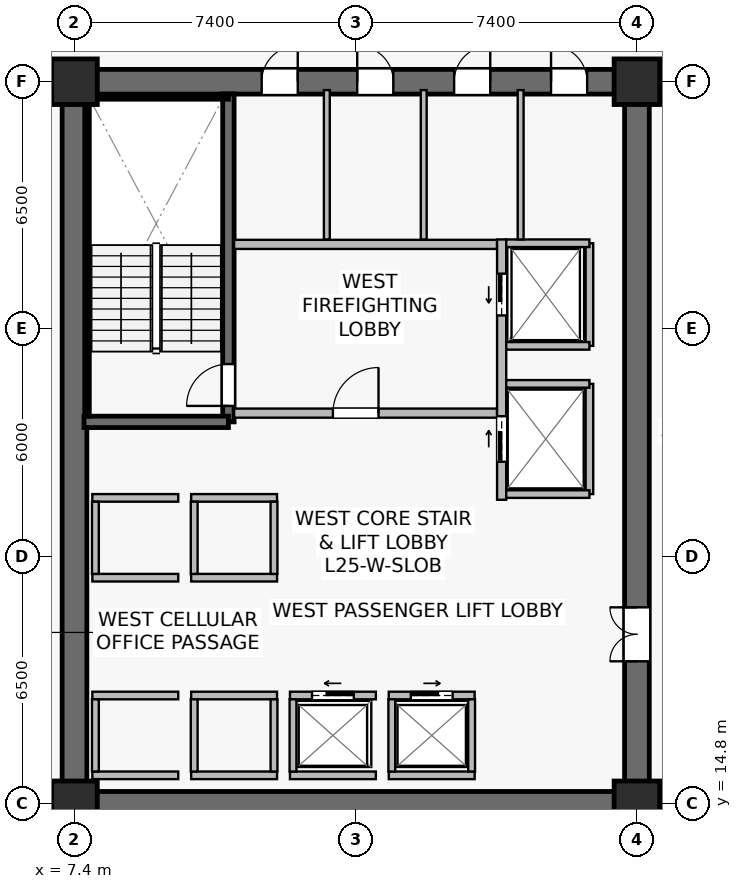
"""IFC4 building model, lengths in metres.
Left out: names, types, materials, properties, quantities, classifications, styles, units other than length and angle.
Written with IfcOpenShell. Run it as: python <this file> out.ifc"""

import sys

from ifc_helpers import new_model, si_unit, direction, frame, frame_2d, origin, origin_2d, place, context, subcontext, project, spatial, rectangle, extrude, source, transform, mapped, element, fill, save


model = new_model("IFC4")
c1 = context("Model", 3, precision=1e-05, world=origin(), true_north=direction((0.0, 1.0)))
c2 = subcontext(c1, "Body", "Model", "MODEL_VIEW")
j1 = project(units=[si_unit("LENGTHUNIT", "METRE"), si_unit("PLANEANGLEUNIT", "RADIAN")], contexts=[c1])
p1 = place(None, origin())
s1 = spatial("IfcSite", under=j1, at=p1, CompositionType="ELEMENT")
p2 = place(p1, origin())
s2 = spatial("IfcBuilding", under=s1, at=p2, CompositionType="ELEMENT")
p3 = place(p2, frame((0.0, 0.0, 105.1)))
s3 = spatial("IfcBuildingStorey", under=s2, at=p3, CompositionType="ELEMENT", Elevation=105.1)
p4 = place(p3, frame((7.075, 14.8, 0.0), z_axis=(0.0, 0.0, 1.0), x_axis=(1.0, 0.0, 0.0)))
e1 = element("IfcWall", 1, at=p4, inside=s3, PredefinedType="SHEAR", context=c2, shape_type="SweptSolid", body=[
    extrude(rectangle(XDim=15.45, YDim=0.65, at=frame_2d((7.725, 0.0))), origin(), (0.0, 0.0, 1.0), 3.79),
])
p5 = place(p3, frame((7.075, 33.8, 0.0), z_axis=(0.0, 0.0, 1.0), x_axis=(1.0, 0.0, 0.0)))
e2 = element("IfcWall", 2, at=p5, inside=s3, PredefinedType="SHEAR", context=c2, shape_type="SweptSolid", body=[
    extrude(rectangle(XDim=15.45, YDim=0.65, at=frame_2d((7.725, 0.0))), origin(), (0.0, 0.0, 1.0), 3.79),
])
p6 = place(p5, frame((5.25, 0.0, 0.0)))
e3 = element("IfcOpeningElement", 3, at=p6, cuts=e2, PredefinedType="OPENING", context=c2, shape_type="SweptSolid", body=[
    extrude(rectangle(XDim=0.95, YDim=2.15, at=frame_2d((0.475, 1.075))), frame((0.0, 0.335, 0.0), z_axis=(0.0, -1.0, 0.0), x_axis=(1.0, 0.0, 0.0)), (0.0, 0.0, 1.0), 0.67),
])
p7 = place(p5, frame((7.765, 0.0, 0.0)))
e4 = element("IfcOpeningElement", 4, at=p7, cuts=e2, PredefinedType="OPENING", context=c2, shape_type="SweptSolid", body=[
    extrude(rectangle(XDim=0.95, YDim=2.15, at=frame_2d((0.475, 1.075))), frame((0.0, 0.335, 0.0), z_axis=(0.0, -1.0, 0.0), x_axis=(1.0, 0.0, 0.0)), (0.0, 0.0, 1.0), 0.67),
])
p8 = place(p5, frame((10.315, 0.0, 0.0)))
e5 = element("IfcOpeningElement", 5, at=p8, cuts=e2, PredefinedType="OPENING", context=c2, shape_type="SweptSolid", body=[
    extrude(rectangle(XDim=0.95, YDim=2.15, at=frame_2d((0.475, 1.075))), frame((0.0, 0.335, 0.0), z_axis=(0.0, -1.0, 0.0), x_axis=(1.0, 0.0, 0.0)), (0.0, 0.0, 1.0), 0.67),
])
p9 = place(p5, frame((12.865, 0.0, 0.0)))
e6 = element("IfcOpeningElement", 6, at=p9, cuts=e2, PredefinedType="OPENING", context=c2, shape_type="SweptSolid", body=[
    extrude(rectangle(XDim=0.95, YDim=2.15, at=frame_2d((0.475, 1.075))), frame((0.0, 0.335, 0.0), z_axis=(0.0, -1.0, 0.0), x_axis=(1.0, 0.0, 0.0)), (0.0, 0.0, 1.0), 0.67),
])
p10 = place(p3, frame((7.4, 15.125, 0.0), z_axis=(0.0, 0.0, 1.0), x_axis=(0.0, 1.0, 0.0)))
e7 = element("IfcWall", 7, at=p10, inside=s3, PredefinedType="SHEAR", context=c2, shape_type="SweptSolid", body=[
    extrude(rectangle(XDim=18.35, YDim=0.65, at=frame_2d((9.175, 0.0))), origin(), (0.0, 0.0, 1.0), 3.79),
])
p11 = place(p3, frame((22.2, 15.125, 0.0), z_axis=(0.0, 0.0, 1.0), x_axis=(0.0, 1.0, 0.0)))
e8 = element("IfcWall", 8, at=p11, inside=s3, PredefinedType="SHEAR", context=c2, shape_type="SweptSolid", body=[
    extrude(rectangle(XDim=18.35, YDim=0.65, at=frame_2d((9.175, 0.0))), origin(), (0.0, 0.0, 1.0), 3.79),
])
p12 = place(p11, frame((3.425, 0.0, 0.0)))
e9 = element("IfcOpeningElement", 9, at=p12, cuts=e8, PredefinedType="OPENING", context=c2, shape_type="SweptSolid", body=[
    extrude(rectangle(XDim=1.42, YDim=2.2, at=frame_2d((0.71, 1.1))), frame((0.0, 0.335, 0.0), z_axis=(0.0, -1.0, 0.0), x_axis=(1.0, 0.0, 0.0)), (0.0, 0.0, 1.0), 0.67),
])
p13 = place(p3, frame((11.45, 24.85, 0.0), z_axis=(0.0, 0.0, 1.0), x_axis=(0.0, 1.0, 0.0)))
e10 = element("IfcWall", 10, at=p13, inside=s3, PredefinedType="SHEAR", context=c2, shape_type="SweptSolid", body=[
    extrude(rectangle(XDim=8.63, YDim=0.3, at=frame_2d((4.315, 0.0))), origin(), (0.0, 0.0, 1.0), 3.79),
])
p14 = place(p13, frame((0.42, 0.0, 0.0)))
e11 = element("IfcOpeningElement", 11, at=p14, cuts=e10, PredefinedType="OPENING", context=c2, shape_type="SweptSolid", body=[
    extrude(rectangle(XDim=1.1, YDim=2.15, at=frame_2d((0.55, 1.075))), frame((0.0, 0.16, 0.0), z_axis=(0.0, -1.0, 0.0), x_axis=(1.0, 0.0, 0.0)), (0.0, 0.0, 1.0), 0.32),
])
p15 = place(p3, frame((7.65, 24.85, 0.0), z_axis=(0.0, 0.0, 1.0), x_axis=(1.0, 0.0, 0.0)))
e12 = element("IfcWall", 12, at=p15, inside=s3, PredefinedType="SHEAR", context=c2, shape_type="SweptSolid", body=[
    extrude(rectangle(XDim=3.8, YDim=0.3, at=frame_2d((1.9, 0.0))), origin(), (0.0, 0.0, 1.0), 3.79),
])
p16 = place(p3, frame((7.73, 33.4, 0.0), z_axis=(0.0, 0.0, 1.0), x_axis=(1.0, 0.0, 0.0)))
e13 = element("IfcWall", 13, at=p16, inside=s3, PredefinedType="SOLIDWALL", context=c2, shape_type="SweptSolid", body=[
    extrude(rectangle(XDim=3.72, YDim=0.12, at=frame_2d((1.86, 0.0))), origin(), (0.0, 0.0, 1.0), 3.79),
])
p17 = place(p3, frame((7.73, 25.0, 0.0), z_axis=(0.0, 0.0, 1.0), x_axis=(0.0, 1.0, 0.0)))
e14 = element("IfcWall", 14, at=p17, inside=s3, PredefinedType="SOLIDWALL", context=c2, shape_type="SweptSolid", body=[
    extrude(rectangle(XDim=8.32, YDim=0.12, at=frame_2d((4.16, 0.0))), origin(), (0.0, 0.0, 1.0), 3.79),
])
m1 = source(origin(), c2, "Body", "SweptSolid", [
    extrude(rectangle(XDim=1.2, YDim=1.2, at=origin_2d()), origin(), (0.0, 0.0, 1.0), 4.1),
])
for number, where, z_axis, x_axis in (
    (15, (7.4, 14.8, 0.0), (0.0, 0.0, 1.0), (1.0, 0.0, 0.0)),
    (16, (22.2, 14.8, 0.0), (0.0, 0.0, 1.0), (1.0, 0.0, 0.0)),
    (17, (7.4, 33.8, 0.0), (0.0, 0.0, 1.0), (1.0, 0.0, 0.0)),
    (18, (22.2, 33.8, 0.0), (0.0, 0.0, 1.0), (1.0, 0.0, 0.0)),
):
    element("IfcColumn", number, at=place(p3, frame(where, z_axis=z_axis, x_axis=x_axis)), inside=s3, PredefinedType="COLUMN", context=c2, shape_type="MappedRepresentation", body=[
        mapped(m1, transform((0.0, 0.0, 0.0), scale=1.0)),
    ])
p18 = place(p3, frame((11.6, 25.08, 0.0), z_axis=(0.0, 0.0, 1.0), x_axis=(1.0, 0.0, 0.0)))
e19 = element("IfcWall", 19, at=p18, inside=s3, PredefinedType="SOLIDWALL", context=c2, shape_type="SweptSolid", body=[
    extrude(rectangle(XDim=6.92, YDim=0.24, at=frame_2d((3.46, 0.0))), origin(), (0.0, 0.0, 1.0), 3.125),
])
p19 = place(p18, frame((2.6, 0.0, 0.0)))
e20 = element("IfcOpeningElement", 20, at=p19, cuts=e19, PredefinedType="OPENING", context=c2, shape_type="SweptSolid", body=[
    extrude(rectangle(XDim=1.2, YDim=2.16, at=frame_2d((0.6, 1.08))), frame((0.0, 0.13, 0.0), z_axis=(0.0, -1.0, 0.0), x_axis=(1.0, 0.0, 0.0)), (0.0, 0.0, 1.0), 0.26),
])
p20 = place(p3, frame((11.6, 29.52, 0.0), z_axis=(0.0, 0.0, 1.0), x_axis=(1.0, 0.0, 0.0)))
e21 = element("IfcWall", 21, at=p20, inside=s3, PredefinedType="SOLIDWALL", context=c2, shape_type="SweptSolid", body=[
    extrude(rectangle(XDim=6.92, YDim=0.24, at=frame_2d((3.46, 0.0))), origin(), (0.0, 0.0, 1.0), 3.125),
])
p21 = place(p3, frame((18.64, 22.8, 0.0), z_axis=(0.0, 0.0, 1.0), x_axis=(0.0, 1.0, 0.0)))
e22 = element("IfcWall", 22, at=p21, inside=s3, PredefinedType="SOLIDWALL", context=c2, shape_type="SweptSolid", body=[
    extrude(rectangle(XDim=6.85, YDim=0.24, at=frame_2d((3.425, 0.0))), origin(), (0.0, 0.0, 1.0), 2.875),
])
p22 = place(p21, frame((4.85, 0.0, 0.0)))
e23 = element("IfcOpeningElement", 23, at=p22, cuts=e22, PredefinedType="OPENING", context=c2, shape_type="SweptSolid", body=[
    extrude(rectangle(XDim=1.1, YDim=2.22, at=frame_2d((0.55, 1.11))), frame((0.0, 0.13, 0.0), z_axis=(0.0, -1.0, 0.0), x_axis=(1.0, 0.0, 0.0)), (0.0, 0.0, 1.0), 0.26),
])
p23 = place(p21, frame((1.0, 0.0, 0.0)))
e24 = element("IfcOpeningElement", 24, at=p23, cuts=e22, PredefinedType="OPENING", context=c2, shape_type="SweptSolid", body=[
    extrude(rectangle(XDim=1.2, YDim=2.22, at=frame_2d((0.6, 1.11))), frame((0.0, 0.13, 0.0), z_axis=(0.0, -1.0, 0.0), x_axis=(1.0, 0.0, 0.0)), (0.0, 0.0, 1.0), 0.26),
])
for number, where, z_axis, x_axis in (
    (25, (7.87, 17.65, 0.0), (0.0, 0.0, 1.0), (1.0, 0.0, 0.0)),
    (26, (7.87, 15.55, 0.0), (0.0, 0.0, 1.0), (1.0, 0.0, 0.0)),
):
    element("IfcWall", number, at=place(p3, frame(where, z_axis=z_axis, x_axis=x_axis)), inside=s3, PredefinedType="SOLIDWALL", context=c2, shape_type="SweptSolid", body=[
        extrude(rectangle(XDim=2.26, YDim=0.2, at=frame_2d((1.13, 0.0))), origin(), (0.0, 0.0, 1.0), 3.79),
    ])
p24 = place(p3, frame((7.95, 15.65, 0.0), z_axis=(0.0, 0.0, 1.0), x_axis=(0.0, 1.0, 0.0)))
e27 = element("IfcWall", 27, at=p24, inside=s3, PredefinedType="SOLIDWALL", context=c2, shape_type="SweptSolid", body=[
    extrude(rectangle(XDim=1.9, YDim=0.18, at=frame_2d((0.95, 0.0))), origin(), (0.0, 0.0, 1.0), 3.79),
])
for number, where, z_axis, x_axis in (
    (28, (10.47, 17.65, 0.0), (0.0, 0.0, 1.0), (1.0, 0.0, 0.0)),
    (29, (10.47, 15.55, 0.0), (0.0, 0.0, 1.0), (1.0, 0.0, 0.0)),
):
    element("IfcWall", number, at=place(p3, frame(where, z_axis=z_axis, x_axis=x_axis)), inside=s3, PredefinedType="SOLIDWALL", context=c2, shape_type="SweptSolid", body=[
        extrude(rectangle(XDim=2.26, YDim=0.2, at=frame_2d((1.13, 0.0))), origin(), (0.0, 0.0, 1.0), 3.79),
    ])
for number, where, z_axis, x_axis in (
    (30, (10.55, 15.65, 0.0), (0.0, 0.0, 1.0), (0.0, 1.0, 0.0)),
    (31, (12.65, 15.65, 0.0), (0.0, 0.0, 1.0), (0.0, 1.0, 0.0)),
):
    element("IfcWall", number, at=place(p3, frame(where, z_axis=z_axis, x_axis=x_axis)), inside=s3, PredefinedType="SOLIDWALL", context=c2, shape_type="SweptSolid", body=[
        extrude(rectangle(XDim=1.9, YDim=0.18, at=frame_2d((0.95, 0.0))), origin(), (0.0, 0.0, 1.0), 3.79),
    ])
p25 = place(p3, frame((13.07, 17.65, 0.0), z_axis=(0.0, 0.0, 1.0), x_axis=(1.0, 0.0, 0.0)))
e32 = element("IfcWall", 32, at=p25, inside=s3, PredefinedType="SOLIDWALL", context=c2, shape_type="SweptSolid", body=[
    extrude(rectangle(XDim=2.26, YDim=0.2, at=frame_2d((1.13, 0.0))), origin(), (0.0, 0.0, 1.0), 3.125),
])
p26 = place(p25, frame((0.58, 0.0, 0.0)))
e33 = element("IfcOpeningElement", 33, at=p26, cuts=e32, PredefinedType="OPENING", context=c2, shape_type="SweptSolid", body=[
    extrude(rectangle(XDim=1.1, YDim=2.22, at=frame_2d((0.55, 1.11))), frame((0.0, 0.11, 0.0), z_axis=(0.0, -1.0, 0.0), x_axis=(1.0, 0.0, 0.0)), (0.0, 0.0, 1.0), 0.22),
])
p27 = place(p3, frame((13.07, 15.55, 0.0), z_axis=(0.0, 0.0, 1.0), x_axis=(1.0, 0.0, 0.0)))
e34 = element("IfcWall", 34, at=p27, inside=s3, PredefinedType="SOLIDWALL", context=c2, shape_type="SweptSolid", body=[
    extrude(rectangle(XDim=2.26, YDim=0.2, at=frame_2d((1.13, 0.0))), origin(), (0.0, 0.0, 1.0), 3.125),
])
p28 = place(p3, frame((13.15, 15.65, 0.0), z_axis=(0.0, 0.0, 1.0), x_axis=(0.0, 1.0, 0.0)))
e35 = element("IfcWall", 35, at=p28, inside=s3, PredefinedType="SOLIDWALL", context=c2, shape_type="SweptSolid", body=[
    extrude(rectangle(XDim=1.9, YDim=0.18, at=frame_2d((0.95, 0.0))), origin(), (0.0, 0.0, 1.0), 3.79),
])
p29 = place(p3, frame((15.67, 17.65, 0.0), z_axis=(0.0, 0.0, 1.0), x_axis=(1.0, 0.0, 0.0)))
e36 = element("IfcWall", 36, at=p29, inside=s3, PredefinedType="SOLIDWALL", context=c2, shape_type="SweptSolid", body=[
    extrude(rectangle(XDim=2.26, YDim=0.2, at=frame_2d((1.13, 0.0))), origin(), (0.0, 0.0, 1.0), 3.79),
])
p30 = place(p29, frame((0.58, 0.0, 0.0)))
e37 = element("IfcOpeningElement", 37, at=p30, cuts=e36, PredefinedType="OPENING", context=c2, shape_type="SweptSolid", body=[
    extrude(rectangle(XDim=1.1, YDim=2.22, at=frame_2d((0.55, 1.11))), frame((0.0, 0.11, 0.0), z_axis=(0.0, -1.0, 0.0), x_axis=(1.0, 0.0, 0.0)), (0.0, 0.0, 1.0), 0.22),
])
p31 = place(p3, frame((15.67, 15.55, 0.0), z_axis=(0.0, 0.0, 1.0), x_axis=(1.0, 0.0, 0.0)))
e38 = element("IfcWall", 38, at=p31, inside=s3, PredefinedType="SOLIDWALL", context=c2, shape_type="SweptSolid", body=[
    extrude(rectangle(XDim=2.26, YDim=0.2, at=frame_2d((1.13, 0.0))), origin(), (0.0, 0.0, 1.0), 3.79),
])
for number, where, z_axis, x_axis in (
    (39, (15.75, 15.65, 0.0), (0.0, 0.0, 1.0), (0.0, 1.0, 0.0)),
    (40, (17.85, 15.65, 0.0), (0.0, 0.0, 1.0), (0.0, 1.0, 0.0)),
):
    element("IfcWall", number, at=place(p3, frame(where, z_axis=z_axis, x_axis=x_axis)), inside=s3, PredefinedType="SOLIDWALL", context=c2, shape_type="SweptSolid", body=[
        extrude(rectangle(XDim=1.9, YDim=0.18, at=frame_2d((0.95, 0.0))), origin(), (0.0, 0.0, 1.0), 3.79),
    ])
for number, where, z_axis, x_axis in (
    (41, (7.87, 20.75, 0.0), (0.0, 0.0, 1.0), (1.0, 0.0, 0.0)),
    (42, (7.87, 22.85, 0.0), (0.0, 0.0, 1.0), (1.0, 0.0, 0.0)),
):
    element("IfcWall", number, at=place(p3, frame(where, z_axis=z_axis, x_axis=x_axis)), inside=s3, PredefinedType="SOLIDWALL", context=c2, shape_type="SweptSolid", body=[
        extrude(rectangle(XDim=2.26, YDim=0.2, at=frame_2d((1.13, 0.0))), origin(), (0.0, 0.0, 1.0), 3.79),
    ])
p32 = place(p3, frame((7.95, 20.85, 0.0), z_axis=(0.0, 0.0, 1.0), x_axis=(0.0, 1.0, 0.0)))
e43 = element("IfcWall", 43, at=p32, inside=s3, PredefinedType="SOLIDWALL", context=c2, shape_type="SweptSolid", body=[
    extrude(rectangle(XDim=1.9, YDim=0.18, at=frame_2d((0.95, 0.0))), origin(), (0.0, 0.0, 1.0), 3.79),
])
for number, where, z_axis, x_axis in (
    (44, (10.47, 20.75, 0.0), (0.0, 0.0, 1.0), (1.0, 0.0, 0.0)),
    (45, (10.47, 22.85, 0.0), (0.0, 0.0, 1.0), (1.0, 0.0, 0.0)),
):
    element("IfcWall", number, at=place(p3, frame(where, z_axis=z_axis, x_axis=x_axis)), inside=s3, PredefinedType="SOLIDWALL", context=c2, shape_type="SweptSolid", body=[
        extrude(rectangle(XDim=2.26, YDim=0.2, at=frame_2d((1.13, 0.0))), origin(), (0.0, 0.0, 1.0), 3.79),
    ])
for number, where, z_axis, x_axis in (
    (46, (10.55, 20.85, 0.0), (0.0, 0.0, 1.0), (0.0, 1.0, 0.0)),
    (47, (12.65, 20.85, 0.0), (0.0, 0.0, 1.0), (0.0, 1.0, 0.0)),
):
    element("IfcWall", number, at=place(p3, frame(where, z_axis=z_axis, x_axis=x_axis)), inside=s3, PredefinedType="SOLIDWALL", context=c2, shape_type="SweptSolid", body=[
        extrude(rectangle(XDim=1.9, YDim=0.18, at=frame_2d((0.95, 0.0))), origin(), (0.0, 0.0, 1.0), 3.79),
    ])
p33 = place(p3, frame((20.95, 26.85, 0.0), z_axis=(0.0, 0.0, 1.0), x_axis=(0.0, 1.0, 0.0)))
e48 = element("IfcWall", 48, at=p33, inside=s3, PredefinedType="SOLIDWALL", context=c2, shape_type="SweptSolid", body=[
    extrude(rectangle(XDim=2.7, YDim=0.2, at=frame_2d((1.35, 0.0))), origin(), (0.0, 0.0, 1.0), 3.79),
])
p34 = place(p3, frame((18.76, 29.55, 0.0), z_axis=(0.0, 0.0, 1.0), x_axis=(1.0, 0.0, 0.0)))
e49 = element("IfcWall", 49, at=p34, inside=s3, PredefinedType="SOLIDWALL", context=c2, shape_type="SweptSolid", body=[
    extrude(rectangle(XDim=2.19, YDim=0.2, at=frame_2d((1.095, 0.0))), origin(), (0.0, 0.0, 1.0), 3.79),
])
p35 = place(p3, frame((18.76, 26.85, 0.0), z_axis=(0.0, 0.0, 1.0), x_axis=(1.0, 0.0, 0.0)))
e50 = element("IfcWall", 50, at=p35, inside=s3, PredefinedType="SOLIDWALL", context=c2, shape_type="SweptSolid", body=[
    extrude(rectangle(XDim=2.19, YDim=0.2, at=frame_2d((1.095, 0.0))), origin(), (0.0, 0.0, 1.0), 3.187),
])
p36 = place(p3, frame((20.95, 22.95, 0.0), z_axis=(0.0, 0.0, 1.0), x_axis=(0.0, 1.0, 0.0)))
e51 = element("IfcWall", 51, at=p36, inside=s3, PredefinedType="SOLIDWALL", context=c2, shape_type="SweptSolid", body=[
    extrude(rectangle(XDim=2.9, YDim=0.2, at=frame_2d((1.45, 0.0))), origin(), (0.0, 0.0, 1.0), 2.875),
])
for number, where, z_axis, x_axis in (
    (52, (18.76, 25.85, 0.0), (0.0, 0.0, 1.0), (1.0, 0.0, 0.0)),
    (53, (18.76, 22.95, 0.0), (0.0, 0.0, 1.0), (1.0, 0.0, 0.0)),
):
    element("IfcWall", number, at=place(p3, frame(where, z_axis=z_axis, x_axis=x_axis)), inside=s3, PredefinedType="SOLIDWALL", context=c2, shape_type="SweptSolid", body=[
        extrude(rectangle(XDim=2.19, YDim=0.2, at=frame_2d((1.095, 0.0))), origin(), (0.0, 0.0, 1.0), 3.79),
    ])
for number, where, z_axis, x_axis in (
    (54, (14.04, 29.65, 0.0), (0.0, 0.0, 1.0), (0.0, 1.0, 0.0)),
    (55, (16.59, 29.65, 0.0), (0.0, 0.0, 1.0), (0.0, 1.0, 0.0)),
    (56, (19.14, 29.65, 0.0), (0.0, 0.0, 1.0), (0.0, 1.0, 0.0)),
):
    element("IfcWall", number, at=place(p3, frame(where, z_axis=z_axis, x_axis=x_axis)), inside=s3, PredefinedType="PLUMBINGWALL", context=c2, shape_type="SweptSolid", body=[
        extrude(rectangle(XDim=3.93, YDim=0.155, at=frame_2d((1.965, 0.0))), origin(), (0.0, 0.0, 1.0), 3.79),
    ])
m2 = source(origin(), c2, "Body", "SweptSolid", [
    extrude(rectangle(XDim=1.1, YDim=2.15, at=frame_2d((0.55, 1.075))), frame((0.0, 0.025, 0.0), z_axis=(0.0, -1.0, 0.0), x_axis=(1.0, 0.0, 0.0)), (0.0, 0.0, 1.0), 0.05),
])
p37 = place(p14, origin())
e57 = element("IfcDoor", 57, at=p37, inside=s3, OperationType="SINGLE_SWING_LEFT", PredefinedType="DOOR", context=c2, shape_type="MappedRepresentation", body=[
    mapped(m2, transform((0.0, 0.0, 0.0), scale=1.0)),
])
fill(e11, e57)
m3 = source(origin(), c2, "Body", "SweptSolid", [
    extrude(rectangle(XDim=1.2, YDim=2.16, at=frame_2d((0.6, 1.08))), frame((0.0, 0.025, 0.0), z_axis=(0.0, -1.0, 0.0), x_axis=(1.0, 0.0, 0.0)), (0.0, 0.0, 1.0), 0.05),
])
p38 = place(p19, origin())
e58 = element("IfcDoor", 58, at=p38, inside=s3, OperationType="SINGLE_SWING_RIGHT", PredefinedType="DOOR", context=c2, shape_type="MappedRepresentation", body=[
    mapped(m3, transform((0.0, 0.0, 0.0), scale=1.0)),
])
fill(e20, e58)
m4 = source(origin(), c2, "Body", "SweptSolid", [
    extrude(rectangle(XDim=1.1, YDim=2.22, at=frame_2d((0.55, 1.11))), frame((0.0, 0.025, 0.0), z_axis=(0.0, -1.0, 0.0), x_axis=(1.0, 0.0, 0.0)), (0.0, 0.0, 1.0), 0.05),
])
p39 = place(p26, origin())
e59 = element("IfcDoor", 59, at=p39, inside=s3, OperationType="SLIDING_TO_LEFT", PredefinedType="USERDEFINED", context=c2, shape_type="MappedRepresentation", body=[
    mapped(m4, transform((0.0, 0.0, 0.0), scale=1.0)),
])
fill(e33, e59)
p40 = place(p30, origin())
e60 = element("IfcDoor", 60, at=p40, inside=s3, OperationType="SLIDING_TO_RIGHT", PredefinedType="USERDEFINED", context=c2, shape_type="MappedRepresentation", body=[
    mapped(m4, transform((0.0, 0.0, 0.0), scale=1.0)),
])
fill(e37, e60)
p41 = place(p22, origin())
e61 = element("IfcDoor", 61, at=p41, inside=s3, OperationType="SLIDING_TO_LEFT", PredefinedType="USERDEFINED", context=c2, shape_type="MappedRepresentation", body=[
    mapped(m4, transform((0.0, 0.0, 0.0), scale=1.0)),
])
fill(e23, e61)
m5 = source(origin(), c2, "Body", "SweptSolid", [
    extrude(rectangle(XDim=1.2, YDim=2.22, at=frame_2d((0.6, 1.11))), frame((0.0, 0.025, 0.0), z_axis=(0.0, -1.0, 0.0), x_axis=(1.0, 0.0, 0.0)), (0.0, 0.0, 1.0), 0.05),
])
p42 = place(p23, origin())
e62 = element("IfcDoor", 62, at=p42, inside=s3, OperationType="SLIDING_TO_RIGHT", PredefinedType="USERDEFINED", context=c2, shape_type="MappedRepresentation", body=[
    mapped(m5, transform((0.0, 0.0, 0.0), scale=1.0)),
])
fill(e24, e62)
m6 = source(origin(), c2, "Body", "SweptSolid", [
    extrude(rectangle(XDim=1.42, YDim=2.2, at=frame_2d((0.71, 1.1))), frame((0.0, 0.025, 0.0), z_axis=(0.0, -1.0, 0.0), x_axis=(1.0, 0.0, 0.0)), (0.0, 0.0, 1.0), 0.05),
])
p43 = place(p12, origin())
e63 = element("IfcDoor", 63, at=p43, inside=s3, OperationType="DOUBLE_DOOR_SINGLE_SWING", PredefinedType="DOOR", context=c2, shape_type="MappedRepresentation", body=[
    mapped(m6, transform((0.0, 0.0, 0.0), scale=1.0)),
])
fill(e9, e63)
m7 = source(origin(), c2, "Body", "SweptSolid", [
    extrude(rectangle(XDim=0.95, YDim=2.15, at=frame_2d((0.475, 1.075))), frame((0.0, 0.025, 0.0), z_axis=(0.0, -1.0, 0.0), x_axis=(1.0, 0.0, 0.0)), (0.0, 0.0, 1.0), 0.05),
])
p44 = place(p6, origin())
e64 = element("IfcDoor", 64, at=p44, inside=s3, OperationType="SINGLE_SWING_RIGHT", PredefinedType="DOOR", context=c2, shape_type="MappedRepresentation", body=[
    mapped(m7, transform((0.0, 0.0, 0.0), scale=1.0)),
])
fill(e3, e64)
p45 = place(p7, origin())
e65 = element("IfcDoor", 65, at=p45, inside=s3, OperationType="SINGLE_SWING_LEFT", PredefinedType="DOOR", context=c2, shape_type="MappedRepresentation", body=[
    mapped(m7, transform((0.0, 0.0, 0.0), scale=1.0)),
])
fill(e4, e65)
p46 = place(p8, origin())
e66 = element("IfcDoor", 66, at=p46, inside=s3, OperationType="SINGLE_SWING_RIGHT", PredefinedType="DOOR", context=c2, shape_type="MappedRepresentation", body=[
    mapped(m7, transform((0.0, 0.0, 0.0), scale=1.0)),
])
fill(e5, e66)
p47 = place(p9, origin())
e67 = element("IfcDoor", 67, at=p47, inside=s3, OperationType="SINGLE_SWING_LEFT", PredefinedType="DOOR", context=c2, shape_type="MappedRepresentation", body=[
    mapped(m7, transform((0.0, 0.0, 0.0), scale=1.0)),
])
fill(e6, e67)
save(model, sys.argv[1])
